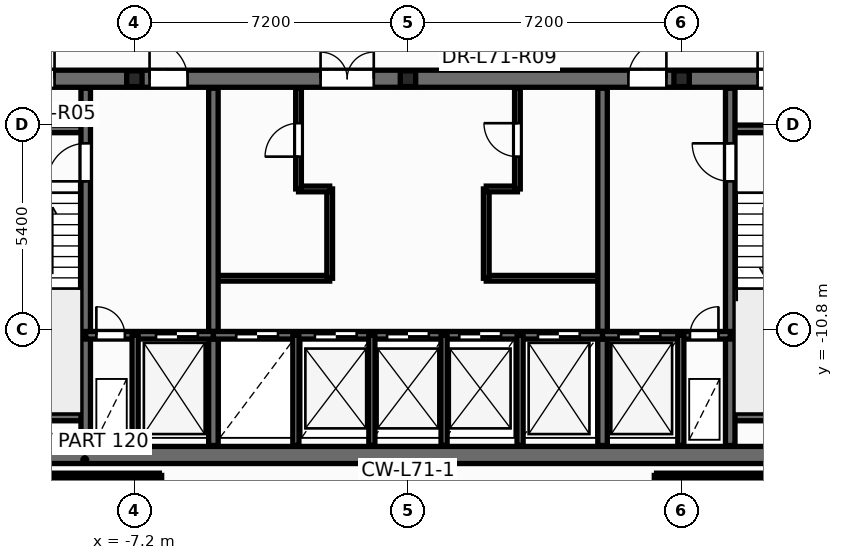
"""IFC4 building model, lengths in metres.
Left out: names, types, materials, properties, quantities, classifications, styles, units other than length and angle.
Written with IfcOpenShell. Run it as: python <this file> out.ifc"""

import sys

from ifc_helpers import new_model, si_unit, direction, frame, frame_2d, origin, origin_2d, place, context, subcontext, project, spatial, rectangle, i_section, extrude, element, fill, save


model = new_model("IFC4")
c1 = context("Model", 3, precision=1e-05, world=origin(), true_north=direction((0.0, 1.0)))
c2 = subcontext(c1, "Body", "Model", "MODEL_VIEW")
j1 = project(units=[si_unit("LENGTHUNIT", "METRE"), si_unit("PLANEANGLEUNIT", "RADIAN")], contexts=[c1])
p1 = place(None, origin())
s1 = spatial("IfcSite", under=j1, at=p1, CompositionType="ELEMENT")
p2 = place(p1, origin())
s2 = spatial("IfcBuilding", under=s1, at=p2, CompositionType="ELEMENT")
p3 = place(p2, frame((0.0, 0.0, 270.6)))
s3 = spatial("IfcBuildingStorey", under=s2, at=p3, CompositionType="ELEMENT", Elevation=270.6)
for number, where, z_axis, x_axis in (
    (1, (-7.2, -4.2, 0.0), (0.0, 0.0, 1.0), (1.0, 0.0, 0.0)),
    (2, (0.0, -4.2, 0.0), (0.0, 0.0, 1.0), (1.0, 0.0, 0.0)),
    (3, (7.2, -4.2, 0.0), (0.0, 0.0, 1.0), (1.0, 0.0, 0.0)),
):
    element("IfcColumn", number, at=place(p3, frame(where, z_axis=z_axis, x_axis=x_axis)), inside=s3, PredefinedType="PILASTER", context=c2, shape_type="SweptSolid", body=[
        extrude(i_section(OverallWidth=0.405, OverallDepth=0.414, WebThickness=0.022, FlangeThickness=0.032, at=origin_2d()), origin(), (0.0, 0.0, 1.0), 3.6),
    ])
p4 = place(p3, frame((-5.12, -9.45, 0.0), z_axis=(0.0, 0.0, 1.0), x_axis=(1.0, 0.0, 0.0)))
e4 = element("IfcWall", 4, at=p4, inside=s3, PredefinedType="PARTITIONING", context=c2, shape_type="SweptSolid", body=[
    extrude(rectangle(XDim=3.06, YDim=0.15, at=frame_2d((1.53, 0.0))), origin(), (0.0, 0.0, 1.0), 3.345),
])
p5 = place(p3, frame((-2.06, -9.45, 0.0), z_axis=(0.0, 0.0, 1.0), x_axis=(0.0, 1.0, 0.0)))
e5 = element("IfcWall", 5, at=p5, inside=s3, PredefinedType="PARTITIONING", context=c2, shape_type="SweptSolid", body=[
    extrude(rectangle(XDim=2.35, YDim=0.15, at=frame_2d((1.175, 0.0))), origin(), (0.0, 0.0, 1.0), 3.345),
])
p6 = place(p3, frame((-2.88, -7.1, 0.0), z_axis=(0.0, 0.0, 1.0), x_axis=(1.0, 0.0, 0.0)))
e6 = element("IfcWall", 6, at=p6, inside=s3, PredefinedType="PARTITIONING", context=c2, shape_type="SweptSolid", body=[
    extrude(rectangle(XDim=0.82, YDim=0.15, at=frame_2d((0.41, 0.0))), origin(), (0.0, 0.0, 1.0), 3.345),
])
p7 = place(p3, frame((-2.88, -7.1, 0.0), z_axis=(0.0, 0.0, 1.0), x_axis=(0.0, 1.0, 0.0)))
e7 = element("IfcWall", 7, at=p7, inside=s3, PredefinedType="PARTITIONING", context=c2, shape_type="SweptSolid", body=[
    extrude(rectangle(XDim=2.65, YDim=0.15, at=frame_2d((1.325, 0.0))), origin(), (0.0, 0.0, 1.0), 3.345),
])
p8 = place(p7, frame((0.85, 0.0, 0.0)))
e8 = element("IfcOpeningElement", 8, at=p8, cuts=e7, PredefinedType="OPENING", context=c2, shape_type="SweptSolid", body=[
    extrude(rectangle(XDim=0.886, YDim=2.104, at=frame_2d((0.44, 1.052))), frame((0.0, 0.085, 0.0), z_axis=(0.0, -1.0, 0.0), x_axis=(1.0, 0.0, 0.0)), (0.0, 0.0, 1.0), 0.17),
])
p9 = place(p3, frame((2.06, -9.45, 0.0), z_axis=(0.0, 0.0, 1.0), x_axis=(1.0, 0.0, 0.0)))
e9 = element("IfcWall", 9, at=p9, inside=s3, PredefinedType="PARTITIONING", context=c2, shape_type="SweptSolid", body=[
    extrude(rectangle(XDim=3.06, YDim=0.15, at=frame_2d((1.53, 0.0))), origin(), (0.0, 0.0, 1.0), 3.345),
])
p10 = place(p3, frame((2.06, -9.45, 0.0), z_axis=(0.0, 0.0, 1.0), x_axis=(0.0, 1.0, 0.0)))
e10 = element("IfcWall", 10, at=p10, inside=s3, PredefinedType="PARTITIONING", context=c2, shape_type="SweptSolid", body=[
    extrude(rectangle(XDim=2.35, YDim=0.15, at=frame_2d((1.175, 0.0))), origin(), (0.0, 0.0, 1.0), 3.345),
])
p11 = place(p3, frame((2.06, -7.1, 0.0), z_axis=(0.0, 0.0, 1.0), x_axis=(1.0, 0.0, 0.0)))
e11 = element("IfcWall", 11, at=p11, inside=s3, PredefinedType="PARTITIONING", context=c2, shape_type="SweptSolid", body=[
    extrude(rectangle(XDim=0.82, YDim=0.15, at=frame_2d((0.41, 0.0))), origin(), (0.0, 0.0, 1.0), 3.345),
])
p12 = place(p3, frame((2.88, -7.1, 0.0), z_axis=(0.0, 0.0, 1.0), x_axis=(0.0, 1.0, 0.0)))
e12 = element("IfcWall", 12, at=p12, inside=s3, PredefinedType="PARTITIONING", context=c2, shape_type="SweptSolid", body=[
    extrude(rectangle(XDim=2.65, YDim=0.15, at=frame_2d((1.325, 0.0))), origin(), (0.0, 0.0, 1.0), 3.345),
])
p13 = place(p12, frame((0.85, 0.0, 0.0)))
e13 = element("IfcOpeningElement", 13, at=p13, cuts=e12, PredefinedType="OPENING", context=c2, shape_type="SweptSolid", body=[
    extrude(rectangle(XDim=0.886, YDim=2.104, at=frame_2d((0.44, 1.052))), frame((0.0, 0.085, 0.0), z_axis=(0.0, -1.0, 0.0), x_axis=(1.0, 0.0, 0.0)), (0.0, 0.0, 1.0), 0.17),
])
p14 = place(p3, frame((-12.65, -14.1, 0.0), z_axis=(0.0, 0.0, 1.0), x_axis=(1.0, 0.0, 0.0)))
e14 = element("IfcWall", 14, at=p14, inside=s3, PredefinedType="SHEAR", context=c2, shape_type="SweptSolid", body=[
    extrude(rectangle(XDim=25.3, YDim=0.45, at=frame_2d((12.65, 0.0))), origin(), (0.0, 0.0, 1.0), 3.6),
])
p15 = place(p3, frame((-12.65, -4.2, 0.0), z_axis=(0.0, 0.0, 1.0), x_axis=(1.0, 0.0, 0.0)))
e15 = element("IfcWall", 15, at=p15, inside=s3, PredefinedType="SHEAR", context=c2, shape_type="SweptSolid", body=[
    extrude(rectangle(XDim=25.3, YDim=0.45, at=frame_2d((12.65, 0.0))), origin(), (0.0, 0.0, 1.0), 3.6),
])
p16 = place(p15, frame((0.95, 0.0, 0.0)))
e16 = element("IfcOpeningElement", 16, at=p16, cuts=e15, PredefinedType="OPENING", context=c2, shape_type="SweptSolid", body=[
    extrude(rectangle(XDim=0.756, YDim=2.054, at=frame_2d((0.375, 1.027))), frame((0.0, 0.235, 0.0), z_axis=(0.0, -1.0, 0.0), x_axis=(1.0, 0.0, 0.0)), (0.0, 0.0, 1.0), 0.47),
])
p17 = place(p15, frame((2.6, 0.0, 0.0)))
e17 = element("IfcOpeningElement", 17, at=p17, cuts=e15, PredefinedType="OPENING", context=c2, shape_type="SweptSolid", body=[
    extrude(rectangle(XDim=0.756, YDim=2.054, at=frame_2d((0.375, 1.027))), frame((0.0, 0.235, 0.0), z_axis=(0.0, -1.0, 0.0), x_axis=(1.0, 0.0, 0.0)), (0.0, 0.0, 1.0), 0.47),
])
p18 = place(p15, frame((21.85, 0.0, 0.0)))
e18 = element("IfcOpeningElement", 18, at=p18, cuts=e15, PredefinedType="OPENING", context=c2, shape_type="SweptSolid", body=[
    extrude(rectangle(XDim=0.756, YDim=2.054, at=frame_2d((0.375, 1.027))), frame((0.0, 0.235, 0.0), z_axis=(0.0, -1.0, 0.0), x_axis=(1.0, 0.0, 0.0)), (0.0, 0.0, 1.0), 0.47),
])
p19 = place(p15, frame((23.5, 0.0, 0.0)))
e19 = element("IfcOpeningElement", 19, at=p19, cuts=e15, PredefinedType="OPENING", context=c2, shape_type="SweptSolid", body=[
    extrude(rectangle(XDim=0.756, YDim=2.054, at=frame_2d((0.375, 1.027))), frame((0.0, 0.235, 0.0), z_axis=(0.0, -1.0, 0.0), x_axis=(1.0, 0.0, 0.0)), (0.0, 0.0, 1.0), 0.47),
])
p20 = place(p15, frame((5.85, 0.0, 0.0)))
e20 = element("IfcOpeningElement", 20, at=p20, cuts=e15, PredefinedType="OPENING", context=c2, shape_type="SweptSolid", body=[
    extrude(rectangle(XDim=1.006, YDim=2.104, at=frame_2d((0.5, 1.052))), frame((0.0, 0.235, 0.0), z_axis=(0.0, -1.0, 0.0), x_axis=(1.0, 0.0, 0.0)), (0.0, 0.0, 1.0), 0.47),
])
p21 = place(p15, frame((10.35, 0.0, 0.0)))
e21 = element("IfcOpeningElement", 21, at=p21, cuts=e15, PredefinedType="OPENING", context=c2, shape_type="SweptSolid", body=[
    extrude(rectangle(XDim=1.406, YDim=2.154, at=frame_2d((0.7, 1.077))), frame((0.0, 0.235, 0.0), z_axis=(0.0, -1.0, 0.0), x_axis=(1.0, 0.0, 0.0)), (0.0, 0.0, 1.0), 0.47),
])
p22 = place(p15, frame((18.45, 0.0, 0.0)))
e22 = element("IfcOpeningElement", 22, at=p22, cuts=e15, PredefinedType="OPENING", context=c2, shape_type="SweptSolid", body=[
    extrude(rectangle(XDim=1.006, YDim=2.104, at=frame_2d((0.5, 1.052))), frame((0.0, 0.235, 0.0), z_axis=(0.0, -1.0, 0.0), x_axis=(1.0, 0.0, 0.0)), (0.0, 0.0, 1.0), 0.47),
])
for number, where, z_axis, x_axis in (
    (23, (-12.35, -5.52, 0.0), (0.0, 0.0, 1.0), (1.0, 0.0, 0.0)),
    (24, (-12.35, -13.1, 0.0), (0.0, 0.0, 1.0), (1.0, 0.0, 0.0)),
    (25, (8.48, -5.52, 0.0), (0.0, 0.0, 1.0), (1.0, 0.0, 0.0)),
    (26, (8.48, -13.1, 0.0), (0.0, 0.0, 1.0), (1.0, 0.0, 0.0)),
):
    element("IfcWall", number, at=place(p3, frame(where, z_axis=z_axis, x_axis=x_axis)), inside=s3, PredefinedType="SOLIDWALL", context=c2, shape_type="SweptSolid", body=[
        extrude(rectangle(XDim=3.87, YDim=0.2, at=frame_2d((1.935, 0.0))), origin(), (0.0, 0.0, 1.0), 3.6),
    ])
p23 = place(p3, frame((-8.48, -13.85, 0.0), z_axis=(0.0, 0.0, 1.0), x_axis=(0.0, 1.0, 0.0)))
e27 = element("IfcWall", 27, at=p23, inside=s3, PredefinedType="SHEAR", context=c2, shape_type="SweptSolid", body=[
    extrude(rectangle(XDim=9.4, YDim=0.25, at=frame_2d((4.7, 0.0))), origin(), (0.0, 0.0, 1.0), 3.6),
])
p24 = place(p23, frame((6.95, 0.0, 0.0)))
e28 = element("IfcOpeningElement", 28, at=p24, cuts=e27, PredefinedType="OPENING", context=c2, shape_type="SweptSolid", body=[
    extrude(rectangle(XDim=1.006, YDim=2.104, at=frame_2d((0.5, 1.052))), frame((0.0, 0.135, 0.0), z_axis=(0.0, -1.0, 0.0), x_axis=(1.0, 0.0, 0.0)), (0.0, 0.0, 1.0), 0.27),
])
p25 = place(p3, frame((8.48, -13.85, 0.0), z_axis=(0.0, 0.0, 1.0), x_axis=(0.0, 1.0, 0.0)))
e29 = element("IfcWall", 29, at=p25, inside=s3, PredefinedType="SHEAR", context=c2, shape_type="SweptSolid", body=[
    extrude(rectangle(XDim=9.4, YDim=0.25, at=frame_2d((4.7, 0.0))), origin(), (0.0, 0.0, 1.0), 3.6),
])
p26 = place(p25, frame((6.95, 0.0, 0.0)))
e30 = element("IfcOpeningElement", 30, at=p26, cuts=e29, PredefinedType="OPENING", context=c2, shape_type="SweptSolid", body=[
    extrude(rectangle(XDim=1.006, YDim=2.104, at=frame_2d((0.5, 1.052))), frame((0.0, 0.135, 0.0), z_axis=(0.0, -1.0, 0.0), x_axis=(1.0, 0.0, 0.0)), (0.0, 0.0, 1.0), 0.27),
])
for number, where, z_axis, x_axis in (
    (31, (-5.12, -13.85, 0.0), (0.0, 0.0, 1.0), (0.0, 1.0, 0.0)),
    (32, (5.12, -13.85, 0.0), (0.0, 0.0, 1.0), (0.0, 1.0, 0.0)),
):
    element("IfcWall", number, at=place(p3, frame(where, z_axis=z_axis, x_axis=x_axis)), inside=s3, PredefinedType="SHEAR", context=c2, shape_type="SweptSolid", body=[
        extrude(rectangle(XDim=9.4, YDim=0.25, at=frame_2d((4.7, 0.0))), origin(), (0.0, 0.0, 1.0), 3.6),
    ])
p27 = place(p3, frame((-8.48, -10.95, 0.0), z_axis=(0.0, 0.0, 1.0), x_axis=(1.0, 0.0, 0.0)))
e33 = element("IfcWall", 33, at=p27, inside=s3, PredefinedType="SOLIDWALL", context=c2, shape_type="SweptSolid", body=[
    extrude(rectangle(XDim=3.36, YDim=0.2, at=frame_2d((1.68, 0.0))), origin(), (0.0, 0.0, 1.0), 3.6),
])
p28 = place(p27, frame((0.28, 0.0, 0.0)))
e34 = element("IfcOpeningElement", 34, at=p28, cuts=e33, PredefinedType="OPENING", context=c2, shape_type="SweptSolid", body=[
    extrude(rectangle(XDim=0.756, YDim=2.054, at=frame_2d((0.375, 1.027))), frame((0.0, 0.11, 0.0), z_axis=(0.0, -1.0, 0.0), x_axis=(1.0, 0.0, 0.0)), (0.0, 0.0, 1.0), 0.22),
])
p29 = place(p27, frame((1.85, 0.0, 0.0)))
e35 = element("IfcOpeningElement", 35, at=p29, cuts=e33, PredefinedType="OPENING", context=c2, shape_type="SweptSolid", body=[
    extrude(rectangle(XDim=1.106, YDim=2.104, at=frame_2d((0.55, 1.052))), frame((0.0, 0.11, 0.0), z_axis=(0.0, -1.0, 0.0), x_axis=(1.0, 0.0, 0.0)), (0.0, 0.0, 1.0), 0.22),
])
p30 = place(p3, frame((-5.12, -10.95, 0.0), z_axis=(0.0, 0.0, 1.0), x_axis=(1.0, 0.0, 0.0)))
e36 = element("IfcWall", 36, at=p30, inside=s3, PredefinedType="SOLIDWALL", context=c2, shape_type="SweptSolid", body=[
    extrude(rectangle(XDim=10.24, YDim=0.2, at=frame_2d((5.12, 0.0))), origin(), (0.0, 0.0, 1.0), 3.6),
])
p31 = place(p30, frame((0.6, 0.0, 0.0)))
e37 = element("IfcOpeningElement", 37, at=p31, cuts=e36, PredefinedType="OPENING", context=c2, shape_type="SweptSolid", body=[
    extrude(rectangle(XDim=1.106, YDim=2.104, at=frame_2d((0.55, 1.052))), frame((0.0, 0.11, 0.0), z_axis=(0.0, -1.0, 0.0), x_axis=(1.0, 0.0, 0.0)), (0.0, 0.0, 1.0), 0.22),
])
p32 = place(p30, frame((2.67, 0.0, 0.0)))
e38 = element("IfcOpeningElement", 38, at=p32, cuts=e36, PredefinedType="OPENING", context=c2, shape_type="SweptSolid", body=[
    extrude(rectangle(XDim=1.106, YDim=2.104, at=frame_2d((0.55, 1.052))), frame((0.0, 0.11, 0.0), z_axis=(0.0, -1.0, 0.0), x_axis=(1.0, 0.0, 0.0)), (0.0, 0.0, 1.0), 0.22),
])
p33 = place(p30, frame((4.57, 0.0, 0.0)))
e39 = element("IfcOpeningElement", 39, at=p33, cuts=e36, PredefinedType="OPENING", context=c2, shape_type="SweptSolid", body=[
    extrude(rectangle(XDim=1.106, YDim=2.104, at=frame_2d((0.55, 1.052))), frame((0.0, 0.11, 0.0), z_axis=(0.0, -1.0, 0.0), x_axis=(1.0, 0.0, 0.0)), (0.0, 0.0, 1.0), 0.22),
])
p34 = place(p30, frame((6.47, 0.0, 0.0)))
e40 = element("IfcOpeningElement", 40, at=p34, cuts=e36, PredefinedType="OPENING", context=c2, shape_type="SweptSolid", body=[
    extrude(rectangle(XDim=1.106, YDim=2.104, at=frame_2d((0.55, 1.052))), frame((0.0, 0.11, 0.0), z_axis=(0.0, -1.0, 0.0), x_axis=(1.0, 0.0, 0.0)), (0.0, 0.0, 1.0), 0.22),
])
p35 = place(p30, frame((8.54, 0.0, 0.0)))
e41 = element("IfcOpeningElement", 41, at=p35, cuts=e36, PredefinedType="OPENING", context=c2, shape_type="SweptSolid", body=[
    extrude(rectangle(XDim=1.106, YDim=2.104, at=frame_2d((0.55, 1.052))), frame((0.0, 0.11, 0.0), z_axis=(0.0, -1.0, 0.0), x_axis=(1.0, 0.0, 0.0)), (0.0, 0.0, 1.0), 0.22),
])
p36 = place(p3, frame((5.12, -10.95, 0.0), z_axis=(0.0, 0.0, 1.0), x_axis=(1.0, 0.0, 0.0)))
e42 = element("IfcWall", 42, at=p36, inside=s3, PredefinedType="SOLIDWALL", context=c2, shape_type="SweptSolid", body=[
    extrude(rectangle(XDim=3.36, YDim=0.2, at=frame_2d((1.68, 0.0))), origin(), (0.0, 0.0, 1.0), 3.6),
])
p37 = place(p36, frame((0.42, 0.0, 0.0)))
e43 = element("IfcOpeningElement", 43, at=p37, cuts=e42, PredefinedType="OPENING", context=c2, shape_type="SweptSolid", body=[
    extrude(rectangle(XDim=1.106, YDim=2.104, at=frame_2d((0.55, 1.052))), frame((0.0, 0.11, 0.0), z_axis=(0.0, -1.0, 0.0), x_axis=(1.0, 0.0, 0.0)), (0.0, 0.0, 1.0), 0.22),
])
p38 = place(p36, frame((2.3, 0.0, 0.0)))
e44 = element("IfcOpeningElement", 44, at=p38, cuts=e42, PredefinedType="OPENING", context=c2, shape_type="SweptSolid", body=[
    extrude(rectangle(XDim=0.756, YDim=2.054, at=frame_2d((0.375, 1.027))), frame((0.0, 0.11, 0.0), z_axis=(0.0, -1.0, 0.0), x_axis=(1.0, 0.0, 0.0)), (0.0, 0.0, 1.0), 0.22),
])
for number, where, z_axis, x_axis in (
    (45, (-7.18, -13.85, 0.0), (0.0, 0.0, 1.0), (0.0, 1.0, 0.0)),
    (46, (7.18, -13.85, 0.0), (0.0, 0.0, 1.0), (0.0, 1.0, 0.0)),
    (47, (-2.95, -13.85, 0.0), (0.0, 0.0, 1.0), (0.0, 1.0, 0.0)),
    (48, (2.95, -13.85, 0.0), (0.0, 0.0, 1.0), (0.0, 1.0, 0.0)),
    (49, (-0.95, -13.85, 0.0), (0.0, 0.0, 1.0), (0.0, 1.0, 0.0)),
    (50, (0.95, -13.85, 0.0), (0.0, 0.0, 1.0), (0.0, 1.0, 0.0)),
):
    element("IfcWall", number, at=place(p3, frame(where, z_axis=z_axis, x_axis=x_axis)), inside=s3, PredefinedType="PARTITIONING", context=c2, shape_type="SweptSolid", body=[
        extrude(rectangle(XDim=2.9, YDim=0.16, at=frame_2d((1.45, 0.0))), origin(), (0.0, 0.0, 1.0), 2.57),
    ])
for number, where, z_axis, x_axis in (
    (51, (-10.468, -14.639, 0.0), (0.0, 0.0, 1.0), (1.0, 0.0, 0.0)),
    (52, (6.542, -14.639, 0.0), (0.0, 0.0, 1.0), (1.0, 0.0, 0.0)),
):
    element("IfcWall", number, at=place(p3, frame(where, z_axis=z_axis, x_axis=x_axis)), inside=s3, PredefinedType="PARTITIONING", context=c2, shape_type="SweptSolid", body=[
        extrude(rectangle(XDim=3.926, YDim=0.12, at=frame_2d((1.963, 0.0))), origin(), (0.0, 0.0, 1.0), 3.345),
    ])
for number, where, z_axis, x_axis in (
    (53, (-6.542, -14.639, 0.0), (0.0, 0.0, 1.0), (0.0, -1.0, 0.0)),
    (54, (6.542, -15.309, 0.0), (0.0, 0.0, 1.0), (0.0, 1.0, 0.0)),
):
    element("IfcWall", number, at=place(p3, frame(where, z_axis=z_axis, x_axis=x_axis)), inside=s3, PredefinedType="PARTITIONING", context=c2, shape_type="SweptSolid", body=[
        extrude(rectangle(XDim=0.67, YDim=0.12, at=frame_2d((0.335, 0.0))), origin(), (0.0, 0.0, 1.0), 2.863),
    ])
p39 = place(p8, origin())
e55 = element("IfcDoor", 55, at=p39, inside=s3, OperationType="SINGLE_SWING_LEFT", PredefinedType="DOOR", context=c2, shape_type="SweptSolid", body=[
    extrude(rectangle(XDim=0.88, YDim=2.1, at=frame_2d((0.44, 1.05))), frame((0.0, 0.025, 0.0), z_axis=(0.0, -1.0, 0.0), x_axis=(1.0, 0.0, 0.0)), (0.0, 0.0, 1.0), 0.05),
])
fill(e8, e55)
p40 = place(p13, origin())
e56 = element("IfcDoor", 56, at=p40, inside=s3, OperationType="SINGLE_SWING_RIGHT", PredefinedType="DOOR", context=c2, shape_type="SweptSolid", body=[
    extrude(rectangle(XDim=0.88, YDim=2.1, at=frame_2d((0.44, 1.05))), frame((0.0, 0.025, 0.0), z_axis=(0.0, -1.0, 0.0), x_axis=(1.0, 0.0, 0.0)), (0.0, 0.0, 1.0), 0.05),
])
fill(e13, e56)
p41 = place(p24, origin())
e57 = element("IfcDoor", 57, at=p41, inside=s3, OperationType="SINGLE_SWING_LEFT", PredefinedType="DOOR", context=c2, shape_type="SweptSolid", body=[
    extrude(rectangle(XDim=1.0, YDim=2.1, at=frame_2d((0.5, 1.05))), frame((0.0, 0.025, 0.0), z_axis=(0.0, -1.0, 0.0), x_axis=(1.0, 0.0, 0.0)), (0.0, 0.0, 1.0), 0.05),
])
fill(e28, e57)
p42 = place(p26, origin())
e58 = element("IfcDoor", 58, at=p42, inside=s3, OperationType="SINGLE_SWING_RIGHT", PredefinedType="DOOR", context=c2, shape_type="SweptSolid", body=[
    extrude(rectangle(XDim=1.0, YDim=2.1, at=frame_2d((0.5, 1.05))), frame((0.0, 0.025, 0.0), z_axis=(0.0, -1.0, 0.0), x_axis=(1.0, 0.0, 0.0)), (0.0, 0.0, 1.0), 0.05),
])
fill(e30, e58)
p43 = place(p28, origin())
e59 = element("IfcDoor", 59, at=p43, inside=s3, OperationType="SINGLE_SWING_LEFT", PredefinedType="DOOR", context=c2, shape_type="SweptSolid", body=[
    extrude(rectangle(XDim=0.75, YDim=2.05, at=frame_2d((0.375, 1.025))), frame((0.0, 0.025, 0.0), z_axis=(0.0, -1.0, 0.0), x_axis=(1.0, 0.0, 0.0)), (0.0, 0.0, 1.0), 0.05),
])
fill(e34, e59)
p44 = place(p29, origin())
e60 = element("IfcDoor", 60, at=p44, inside=s3, OperationType="DOUBLE_DOOR_SLIDING", PredefinedType="DOOR", context=c2, shape_type="SweptSolid", body=[
    extrude(rectangle(XDim=1.1, YDim=2.1, at=frame_2d((0.55, 1.05))), frame((0.0, 0.025, 0.0), z_axis=(0.0, -1.0, 0.0), x_axis=(1.0, 0.0, 0.0)), (0.0, 0.0, 1.0), 0.05),
])
fill(e35, e60)
p45 = place(p37, origin())
e61 = element("IfcDoor", 61, at=p45, inside=s3, OperationType="DOUBLE_DOOR_SLIDING", PredefinedType="DOOR", context=c2, shape_type="SweptSolid", body=[
    extrude(rectangle(XDim=1.1, YDim=2.1, at=frame_2d((0.55, 1.05))), frame((0.0, 0.025, 0.0), z_axis=(0.0, -1.0, 0.0), x_axis=(1.0, 0.0, 0.0)), (0.0, 0.0, 1.0), 0.05),
])
fill(e43, e61)
p46 = place(p38, origin())
e62 = element("IfcDoor", 62, at=p46, inside=s3, OperationType="SINGLE_SWING_RIGHT", PredefinedType="DOOR", context=c2, shape_type="SweptSolid", body=[
    extrude(rectangle(XDim=0.75, YDim=2.05, at=frame_2d((0.375, 1.025))), frame((0.0, 0.025, 0.0), z_axis=(0.0, -1.0, 0.0), x_axis=(1.0, 0.0, 0.0)), (0.0, 0.0, 1.0), 0.05),
])
fill(e44, e62)
p47 = place(p31, origin())
e63 = element("IfcDoor", 63, at=p47, inside=s3, OperationType="DOUBLE_DOOR_SLIDING", PredefinedType="DOOR", context=c2, shape_type="SweptSolid", body=[
    extrude(rectangle(XDim=1.1, YDim=2.1, at=frame_2d((0.55, 1.05))), frame((0.0, 0.025, 0.0), z_axis=(0.0, -1.0, 0.0), x_axis=(1.0, 0.0, 0.0)), (0.0, 0.0, 1.0), 0.05),
])
fill(e37, e63)
p48 = place(p32, origin())
e64 = element("IfcDoor", 64, at=p48, inside=s3, OperationType="DOUBLE_DOOR_SLIDING", PredefinedType="DOOR", context=c2, shape_type="SweptSolid", body=[
    extrude(rectangle(XDim=1.1, YDim=2.1, at=frame_2d((0.55, 1.05))), frame((0.0, 0.025, 0.0), z_axis=(0.0, -1.0, 0.0), x_axis=(1.0, 0.0, 0.0)), (0.0, 0.0, 1.0), 0.05),
])
fill(e38, e64)
p49 = place(p33, origin())
e65 = element("IfcDoor", 65, at=p49, inside=s3, OperationType="DOUBLE_DOOR_SLIDING", PredefinedType="DOOR", context=c2, shape_type="SweptSolid", body=[
    extrude(rectangle(XDim=1.1, YDim=2.1, at=frame_2d((0.55, 1.05))), frame((0.0, 0.025, 0.0), z_axis=(0.0, -1.0, 0.0), x_axis=(1.0, 0.0, 0.0)), (0.0, 0.0, 1.0), 0.05),
])
fill(e39, e65)
p50 = place(p34, origin())
e66 = element("IfcDoor", 66, at=p50, inside=s3, OperationType="DOUBLE_DOOR_SLIDING", PredefinedType="DOOR", context=c2, shape_type="SweptSolid", body=[
    extrude(rectangle(XDim=1.1, YDim=2.1, at=frame_2d((0.55, 1.05))), frame((0.0, 0.025, 0.0), z_axis=(0.0, -1.0, 0.0), x_axis=(1.0, 0.0, 0.0)), (0.0, 0.0, 1.0), 0.05),
])
fill(e40, e66)
p51 = place(p35, origin())
e67 = element("IfcDoor", 67, at=p51, inside=s3, OperationType="DOUBLE_DOOR_SLIDING", PredefinedType="DOOR", context=c2, shape_type="SweptSolid", body=[
    extrude(rectangle(XDim=1.1, YDim=2.1, at=frame_2d((0.55, 1.05))), frame((0.0, 0.025, 0.0), z_axis=(0.0, -1.0, 0.0), x_axis=(1.0, 0.0, 0.0)), (0.0, 0.0, 1.0), 0.05),
])
fill(e41, e67)
p52 = place(p17, origin())
e68 = element("IfcDoor", 68, at=p52, inside=s3, OperationType="SINGLE_SWING_RIGHT", PredefinedType="DOOR", context=c2, shape_type="SweptSolid", body=[
    extrude(rectangle(XDim=0.75, YDim=2.05, at=frame_2d((0.375, 1.025))), frame((0.0, 0.025, 0.0), z_axis=(0.0, -1.0, 0.0), x_axis=(1.0, 0.0, 0.0)), (0.0, 0.0, 1.0), 0.05),
])
fill(e17, e68)
p53 = place(p18, origin())
e69 = element("IfcDoor", 69, at=p53, inside=s3, OperationType="SINGLE_SWING_LEFT", PredefinedType="DOOR", context=c2, shape_type="SweptSolid", body=[
    extrude(rectangle(XDim=0.75, YDim=2.05, at=frame_2d((0.375, 1.025))), frame((0.0, 0.025, 0.0), z_axis=(0.0, -1.0, 0.0), x_axis=(1.0, 0.0, 0.0)), (0.0, 0.0, 1.0), 0.05),
])
fill(e18, e69)
p54 = place(p20, origin())
e70 = element("IfcDoor", 70, at=p54, inside=s3, OperationType="SINGLE_SWING_LEFT", PredefinedType="DOOR", context=c2, shape_type="SweptSolid", body=[
    extrude(rectangle(XDim=1.0, YDim=2.1, at=frame_2d((0.5, 1.05))), frame((0.0, 0.025, 0.0), z_axis=(0.0, -1.0, 0.0), x_axis=(1.0, 0.0, 0.0)), (0.0, 0.0, 1.0), 0.05),
])
fill(e20, e70)
p55 = place(p21, origin())
e71 = element("IfcDoor", 71, at=p55, inside=s3, OperationType="DOUBLE_DOOR_SINGLE_SWING", PredefinedType="DOOR", context=c2, shape_type="SweptSolid", body=[
    extrude(rectangle(XDim=1.4, YDim=2.15, at=frame_2d((0.7, 1.075))), frame((0.0, 0.025, 0.0), z_axis=(0.0, -1.0, 0.0), x_axis=(1.0, 0.0, 0.0)), (0.0, 0.0, 1.0), 0.05),
])
fill(e21, e71)
p56 = place(p22, origin())
e72 = element("IfcDoor", 72, at=p56, inside=s3, OperationType="SINGLE_SWING_RIGHT", PredefinedType="DOOR", context=c2, shape_type="SweptSolid", body=[
    extrude(rectangle(XDim=1.0, YDim=2.1, at=frame_2d((0.5, 1.05))), frame((0.0, 0.025, 0.0), z_axis=(0.0, -1.0, 0.0), x_axis=(1.0, 0.0, 0.0)), (0.0, 0.0, 1.0), 0.05),
])
fill(e22, e72)
save(model, sys.argv[1])
